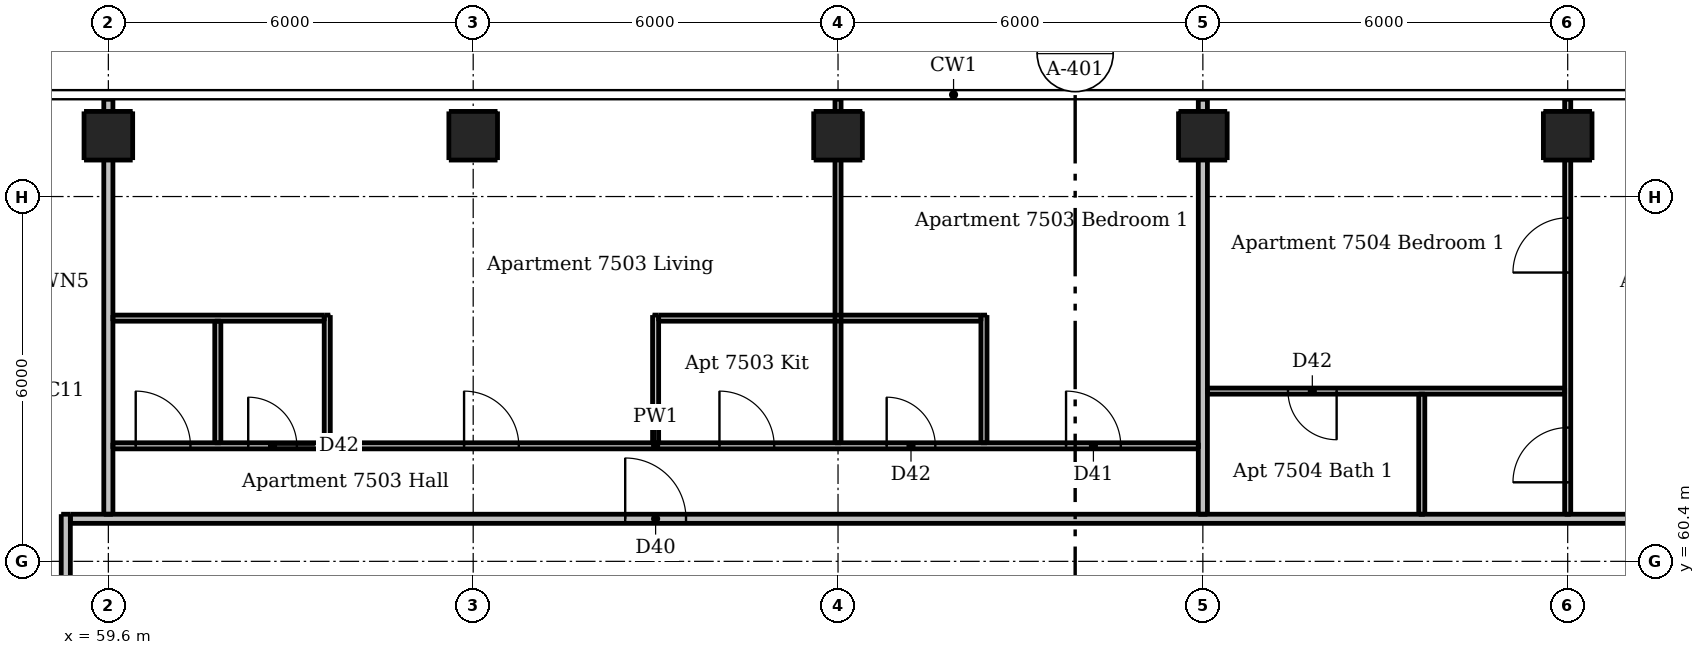
"""IFC4 building model, lengths in metres.
Left out: names, types, materials, properties, quantities, classifications, styles, units other than length and angle.
Written with IfcOpenShell. Run it as: python <this file> out.ifc"""

import sys

from ifc_helpers import new_model, si_unit, direction, frame, frame_2d, origin, origin_2d, place, context, subcontext, project, spatial, rectangle, extrude, element, fill, save


model = new_model("IFC4")
c1 = context("Model", 3, precision=1e-05, world=origin(), true_north=direction((0.0, 1.0)))
c2 = subcontext(c1, "Body", "Model", "MODEL_VIEW")
j1 = project(units=[si_unit("LENGTHUNIT", "METRE"), si_unit("PLANEANGLEUNIT", "RADIAN")], contexts=[c1])
p1 = place(None, origin())
s1 = spatial("IfcSite", under=j1, at=p1, CompositionType="ELEMENT")
p2 = place(p1, origin())
s2 = spatial("IfcBuilding", under=s1, at=p2, CompositionType="ELEMENT")
p3 = place(p2, frame((0.0, 0.0, 278.5)))
s3 = spatial("IfcBuildingStorey", under=s2, at=p3, CompositionType="ELEMENT", Elevation=278.5)
for number, where, z_axis, x_axis in (
    (1, (59.6, 67.4, 0.0), (0.0, 0.0, 1.0), (1.0, 0.0, 0.0)),
    (2, (65.6, 67.4, 0.0), (0.0, 0.0, 1.0), (1.0, 0.0, 0.0)),
    (3, (71.6, 67.4, 0.0), (0.0, 0.0, 1.0), (1.0, 0.0, 0.0)),
    (4, (77.6, 67.4, 0.0), (0.0, 0.0, 1.0), (1.0, 0.0, 0.0)),
    (5, (83.6, 67.4, 0.0), (0.0, 0.0, 1.0), (1.0, 0.0, 0.0)),
):
    element("IfcColumn", number, at=place(p3, frame(where, z_axis=z_axis, x_axis=x_axis)), inside=s3, PredefinedType="COLUMN", context=c2, shape_type="SweptSolid", body=[
        extrude(rectangle(XDim=0.8, YDim=0.8, at=origin_2d()), origin(), (0.0, 0.0, 1.0), 3.0),
    ])
p4 = place(p3, frame((61.4, 62.35, 0.0), z_axis=(0.0, 0.0, 1.0), x_axis=(0.0, 1.0, 0.0)))
e6 = element("IfcWall", 6, at=p4, inside=s3, PredefinedType="PARTITIONING", context=c2, shape_type="SweptSolid", body=[
    extrude(rectangle(XDim=2.0, YDim=0.1, at=frame_2d((1.0, 0.0))), origin(), (0.0, 0.0, 1.0), 3.0),
])
for number, where, z_axis, x_axis in (
    (7, (63.2, 62.35, 0.0), (0.0, 0.0, 1.0), (0.0, 1.0, 0.0)),
    (8, (68.6, 62.35, 0.0), (0.0, 0.0, 1.0), (0.0, 1.0, 0.0)),
):
    element("IfcWall", number, at=place(p3, frame(where, z_axis=z_axis, x_axis=x_axis)), inside=s3, PredefinedType="PARTITIONING", context=c2, shape_type="SweptSolid", body=[
        extrude(rectangle(XDim=2.1, YDim=0.1, at=frame_2d((1.05, 0.0))), origin(), (0.0, 0.0, 1.0), 3.0),
    ])
p5 = place(p3, frame((71.6, 62.35, 0.0), z_axis=(0.0, 0.0, 1.0), x_axis=(0.0, 1.0, 0.0)))
e9 = element("IfcWall", 9, at=p5, inside=s3, PredefinedType="PARTITIONING", context=c2, shape_type="SweptSolid", body=[
    extrude(rectangle(XDim=5.65, YDim=0.1, at=frame_2d((2.825, 0.0))), origin(), (0.0, 0.0, 1.0), 2.466),
])
p6 = place(p3, frame((74.0, 62.35, 0.0), z_axis=(0.0, 0.0, 1.0), x_axis=(0.0, 1.0, 0.0)))
e10 = element("IfcWall", 10, at=p6, inside=s3, PredefinedType="PARTITIONING", context=c2, shape_type="SweptSolid", body=[
    extrude(rectangle(XDim=2.1, YDim=0.1, at=frame_2d((1.05, 0.0))), origin(), (0.0, 0.0, 1.0), 3.0),
])
p7 = place(p3, frame((81.2, 61.175, 0.0), z_axis=(0.0, 0.0, 1.0), x_axis=(0.0, 1.0, 0.0)))
e11 = element("IfcWall", 11, at=p7, inside=s3, PredefinedType="PARTITIONING", context=c2, shape_type="SweptSolid", body=[
    extrude(rectangle(XDim=1.975, YDim=0.1, at=frame_2d((0.987, 0.0))), origin(), (0.0, 0.0, 1.0), 3.0),
])
p8 = place(p3, frame((83.6, 61.175, 0.0), z_axis=(0.0, 0.0, 1.0), x_axis=(0.0, 1.0, 0.0)))
e12 = element("IfcWall", 12, at=p8, inside=s3, PredefinedType="PARTITIONING", context=c2, shape_type="SweptSolid", body=[
    extrude(rectangle(XDim=6.825, YDim=0.1, at=frame_2d((3.413, 0.0))), origin(), (0.0, 0.0, 1.0), 2.466),
])
p9 = place(p8, frame((0.525, 0.0, 0.0)))
e13 = element("IfcOpeningElement", 13, at=p9, cuts=e12, PredefinedType="OPENING", context=c2, shape_type="SweptSolid", body=[
    extrude(rectangle(XDim=0.9, YDim=2.1, at=frame_2d((0.45, 1.05))), frame((0.0, 0.06, 0.0), z_axis=(0.0, -1.0, 0.0), x_axis=(1.0, 0.0, 0.0)), (0.0, 0.0, 1.0), 0.12),
])
p10 = place(p8, frame((3.975, 0.0, 0.0)))
e14 = element("IfcOpeningElement", 14, at=p10, cuts=e12, PredefinedType="OPENING", context=c2, shape_type="SweptSolid", body=[
    extrude(rectangle(XDim=0.9, YDim=2.1, at=frame_2d((0.45, 1.05))), frame((0.0, 0.06, 0.0), z_axis=(0.0, -1.0, 0.0), x_axis=(1.0, 0.0, 0.0)), (0.0, 0.0, 1.0), 0.12),
])
p11 = place(p3, frame((59.675, 64.4, 0.0), z_axis=(0.0, 0.0, 1.0), x_axis=(1.0, 0.0, 0.0)))
e15 = element("IfcWall", 15, at=p11, inside=s3, PredefinedType="PARTITIONING", context=c2, shape_type="SweptSolid", body=[
    extrude(rectangle(XDim=3.475, YDim=0.1, at=frame_2d((1.737, 0.0))), origin(), (0.0, 0.0, 1.0), 3.0),
])
p12 = place(p3, frame((68.65, 64.4, 0.0), z_axis=(0.0, 0.0, 1.0), x_axis=(1.0, 0.0, 0.0)))
e16 = element("IfcWall", 16, at=p12, inside=s3, PredefinedType="PARTITIONING", context=c2, shape_type="SweptSolid", body=[
    extrude(rectangle(XDim=5.3, YDim=0.1, at=frame_2d((2.65, 0.0))), origin(), (0.0, 0.0, 1.0), 3.0),
])
p13 = place(p3, frame((83.55, 63.2, 0.0), z_axis=(0.0, 0.0, 1.0), x_axis=(-1.0, 0.0, 0.0)))
e17 = element("IfcWall", 17, at=p13, inside=s3, PredefinedType="PARTITIONING", context=c2, shape_type="SweptSolid", body=[
    extrude(rectangle(XDim=5.875, YDim=0.1, at=frame_2d((2.938, 0.0))), origin(), (0.0, 0.0, 1.0), 3.0),
])
p14 = place(p13, frame((3.75, 0.0, 0.0)))
e18 = element("IfcOpeningElement", 18, at=p14, cuts=e17, PredefinedType="OPENING", context=c2, shape_type="SweptSolid", body=[
    extrude(rectangle(XDim=0.8, YDim=2.1, at=frame_2d((0.4, 1.05))), frame((0.0, 0.06, 0.0), z_axis=(0.0, -1.0, 0.0), x_axis=(1.0, 0.0, 0.0)), (0.0, 0.0, 1.0), 0.12),
])
p15 = place(p3, frame((59.675, 62.3, 0.0), z_axis=(0.0, 0.0, 1.0), x_axis=(1.0, 0.0, 0.0)))
e19 = element("IfcWall", 19, at=p15, inside=s3, PredefinedType="PARTITIONING", context=c2, shape_type="SweptSolid", body=[
    extrude(rectangle(XDim=17.85, YDim=0.1, at=frame_2d((8.925, 0.0))), origin(), (0.0, 0.0, 1.0), 3.0),
])
p16 = place(p15, frame((5.775, 0.0, 0.0)))
e20 = element("IfcOpeningElement", 20, at=p16, cuts=e19, PredefinedType="OPENING", context=c2, shape_type="SweptSolid", body=[
    extrude(rectangle(XDim=0.9, YDim=2.1, at=frame_2d((0.45, 1.05))), frame((0.0, 0.06, 0.0), z_axis=(0.0, -1.0, 0.0), x_axis=(1.0, 0.0, 0.0)), (0.0, 0.0, 1.0), 0.12),
])
p17 = place(p15, frame((9.975, 0.0, 0.0)))
e21 = element("IfcOpeningElement", 21, at=p17, cuts=e19, PredefinedType="OPENING", context=c2, shape_type="SweptSolid", body=[
    extrude(rectangle(XDim=0.9, YDim=2.1, at=frame_2d((0.45, 1.05))), frame((0.0, 0.06, 0.0), z_axis=(0.0, -1.0, 0.0), x_axis=(1.0, 0.0, 0.0)), (0.0, 0.0, 1.0), 0.12),
])
p18 = place(p15, frame((0.375, 0.0, 0.0)))
e22 = element("IfcOpeningElement", 22, at=p18, cuts=e19, PredefinedType="OPENING", context=c2, shape_type="SweptSolid", body=[
    extrude(rectangle(XDim=0.9, YDim=2.1, at=frame_2d((0.45, 1.05))), frame((0.0, 0.06, 0.0), z_axis=(0.0, -1.0, 0.0), x_axis=(1.0, 0.0, 0.0)), (0.0, 0.0, 1.0), 0.12),
])
p19 = place(p15, frame((2.225, 0.0, 0.0)))
e23 = element("IfcOpeningElement", 23, at=p19, cuts=e19, PredefinedType="OPENING", context=c2, shape_type="SweptSolid", body=[
    extrude(rectangle(XDim=0.8, YDim=2.1, at=frame_2d((0.4, 1.05))), frame((0.0, 0.06, 0.0), z_axis=(0.0, -1.0, 0.0), x_axis=(1.0, 0.0, 0.0)), (0.0, 0.0, 1.0), 0.12),
])
p20 = place(p15, frame((15.675, 0.0, 0.0)))
e24 = element("IfcOpeningElement", 24, at=p20, cuts=e19, PredefinedType="OPENING", context=c2, shape_type="SweptSolid", body=[
    extrude(rectangle(XDim=0.9, YDim=2.1, at=frame_2d((0.45, 1.05))), frame((0.0, 0.06, 0.0), z_axis=(0.0, -1.0, 0.0), x_axis=(1.0, 0.0, 0.0)), (0.0, 0.0, 1.0), 0.12),
])
p21 = place(p15, frame((12.725, 0.0, 0.0)))
e25 = element("IfcOpeningElement", 25, at=p21, cuts=e19, PredefinedType="OPENING", context=c2, shape_type="SweptSolid", body=[
    extrude(rectangle(XDim=0.8, YDim=2.1, at=frame_2d((0.4, 1.05))), frame((0.0, 0.06, 0.0), z_axis=(0.0, -1.0, 0.0), x_axis=(1.0, 0.0, 0.0)), (0.0, 0.0, 1.0), 0.12),
])
p22 = place(p3, frame((58.9, 30.325, 0.0), z_axis=(0.0, 0.0, 1.0), x_axis=(0.0, 1.0, 0.0)))
e26 = element("IfcWall", 26, at=p22, inside=s3, PredefinedType="PARTITIONING", context=c2, shape_type="SweptSolid", body=[
    extrude(rectangle(XDim=30.85, YDim=0.15, at=frame_2d((15.425, 0.0))), origin(), (0.0, 0.0, 1.0), 3.0),
])
p23 = place(p22, frame((9.225, 0.0, 0.0)))
e27 = element("IfcOpeningElement", 27, at=p23, cuts=e26, PredefinedType="OPENING", context=c2, shape_type="SweptSolid", body=[
    extrude(rectangle(XDim=1.0, YDim=2.1, at=frame_2d((0.5, 1.05))), frame((0.0, 0.085, 0.0), z_axis=(0.0, -1.0, 0.0), x_axis=(1.0, 0.0, 0.0)), (0.0, 0.0, 1.0), 0.17),
])
p24 = place(p22, frame((26.925, 0.0, 0.0)))
e28 = element("IfcOpeningElement", 28, at=p24, cuts=e26, PredefinedType="OPENING", context=c2, shape_type="SweptSolid", body=[
    extrude(rectangle(XDim=1.0, YDim=2.1, at=frame_2d((0.5, 1.05))), frame((0.0, 0.085, 0.0), z_axis=(0.0, -1.0, 0.0), x_axis=(1.0, 0.0, 0.0)), (0.0, 0.0, 1.0), 0.17),
])
p25 = place(p3, frame((59.6, 61.175, 0.0), z_axis=(0.0, 0.0, 1.0), x_axis=(0.0, 1.0, 0.0)))
e29 = element("IfcWall", 29, at=p25, inside=s3, PredefinedType="PARTITIONING", context=c2, shape_type="SweptSolid", body=[
    extrude(rectangle(XDim=6.825, YDim=0.15, at=frame_2d((3.413, 0.0))), origin(), (0.0, 0.0, 1.0), 2.46),
])
p26 = place(p3, frame((77.6, 61.175, 0.0), z_axis=(0.0, 0.0, 1.0), x_axis=(0.0, 1.0, 0.0)))
e30 = element("IfcWall", 30, at=p26, inside=s3, PredefinedType="PARTITIONING", context=c2, shape_type="SweptSolid", body=[
    extrude(rectangle(XDim=6.825, YDim=0.15, at=frame_2d((3.413, 0.0))), origin(), (0.0, 0.0, 1.0), 2.466),
])
p27 = place(p3, frame((58.975, 61.1, 0.0), z_axis=(0.0, 0.0, 1.0), x_axis=(1.0, 0.0, 0.0)))
e31 = element("IfcWall", 31, at=p27, inside=s3, PredefinedType="PARTITIONING", context=c2, shape_type="SweptSolid", body=[
    extrude(rectangle(XDim=29.25, YDim=0.15, at=frame_2d((14.625, 0.0))), origin(), (0.0, 0.0, 1.0), 3.0),
])
p28 = place(p27, frame((9.125, 0.0, 0.0)))
e32 = element("IfcOpeningElement", 32, at=p28, cuts=e31, PredefinedType="OPENING", context=c2, shape_type="SweptSolid", body=[
    extrude(rectangle(XDim=1.0, YDim=2.1, at=frame_2d((0.5, 1.05))), frame((0.0, 0.085, 0.0), z_axis=(0.0, -1.0, 0.0), x_axis=(1.0, 0.0, 0.0)), (0.0, 0.0, 1.0), 0.17),
])
p29 = place(p27, frame((26.475, 0.0, 0.0)))
e33 = element("IfcOpeningElement", 33, at=p29, cuts=e31, PredefinedType="OPENING", context=c2, shape_type="SweptSolid", body=[
    extrude(rectangle(XDim=1.0, YDim=2.1, at=frame_2d((0.5, 1.05))), frame((0.0, 0.085, 0.0), z_axis=(0.0, -1.0, 0.0), x_axis=(1.0, 0.0, 0.0)), (0.0, 0.0, 1.0), 0.17),
])
p30 = place(p28, origin())
e34 = element("IfcDoor", 34, at=p30, inside=s3, OperationType="SINGLE_SWING_LEFT", PredefinedType="DOOR", context=c2, shape_type="SweptSolid", body=[
    extrude(rectangle(XDim=1.0, YDim=2.1, at=frame_2d((0.5, 1.05))), frame((0.0, 0.025, 0.0), z_axis=(0.0, -1.0, 0.0), x_axis=(1.0, 0.0, 0.0)), (0.0, 0.0, 1.0), 0.05),
])
fill(e32, e34)
p31 = place(p16, origin())
e35 = element("IfcDoor", 35, at=p31, inside=s3, OperationType="SINGLE_SWING_LEFT", PredefinedType="DOOR", context=c2, shape_type="SweptSolid", body=[
    extrude(rectangle(XDim=0.9, YDim=2.1, at=frame_2d((0.45, 1.05))), frame((0.0, 0.025, 0.0), z_axis=(0.0, -1.0, 0.0), x_axis=(1.0, 0.0, 0.0)), (0.0, 0.0, 1.0), 0.05),
])
fill(e20, e35)
p32 = place(p17, origin())
e36 = element("IfcDoor", 36, at=p32, inside=s3, OperationType="SINGLE_SWING_LEFT", PredefinedType="DOOR", context=c2, shape_type="SweptSolid", body=[
    extrude(rectangle(XDim=0.9, YDim=2.1, at=frame_2d((0.45, 1.05))), frame((0.0, 0.025, 0.0), z_axis=(0.0, -1.0, 0.0), x_axis=(1.0, 0.0, 0.0)), (0.0, 0.0, 1.0), 0.05),
])
fill(e21, e36)
p33 = place(p18, origin())
e37 = element("IfcDoor", 37, at=p33, inside=s3, OperationType="SINGLE_SWING_LEFT", PredefinedType="DOOR", context=c2, shape_type="SweptSolid", body=[
    extrude(rectangle(XDim=0.9, YDim=2.1, at=frame_2d((0.45, 1.05))), frame((0.0, 0.025, 0.0), z_axis=(0.0, -1.0, 0.0), x_axis=(1.0, 0.0, 0.0)), (0.0, 0.0, 1.0), 0.05),
])
fill(e22, e37)
p34 = place(p19, origin())
e38 = element("IfcDoor", 38, at=p34, inside=s3, OperationType="SINGLE_SWING_LEFT", PredefinedType="DOOR", context=c2, shape_type="SweptSolid", body=[
    extrude(rectangle(XDim=0.8, YDim=2.1, at=frame_2d((0.4, 1.05))), frame((0.0, 0.025, 0.0), z_axis=(0.0, -1.0, 0.0), x_axis=(1.0, 0.0, 0.0)), (0.0, 0.0, 1.0), 0.05),
])
fill(e23, e38)
p35 = place(p20, origin())
e39 = element("IfcDoor", 39, at=p35, inside=s3, OperationType="SINGLE_SWING_LEFT", PredefinedType="DOOR", context=c2, shape_type="SweptSolid", body=[
    extrude(rectangle(XDim=0.9, YDim=2.1, at=frame_2d((0.45, 1.05))), frame((0.0, 0.025, 0.0), z_axis=(0.0, -1.0, 0.0), x_axis=(1.0, 0.0, 0.0)), (0.0, 0.0, 1.0), 0.05),
])
fill(e24, e39)
p36 = place(p21, origin())
e40 = element("IfcDoor", 40, at=p36, inside=s3, OperationType="SINGLE_SWING_LEFT", PredefinedType="DOOR", context=c2, shape_type="SweptSolid", body=[
    extrude(rectangle(XDim=0.8, YDim=2.1, at=frame_2d((0.4, 1.05))), frame((0.0, 0.025, 0.0), z_axis=(0.0, -1.0, 0.0), x_axis=(1.0, 0.0, 0.0)), (0.0, 0.0, 1.0), 0.05),
])
fill(e25, e40)
p37 = place(p9, origin())
e41 = element("IfcDoor", 41, at=p37, inside=s3, OperationType="SINGLE_SWING_LEFT", PredefinedType="DOOR", context=c2, shape_type="SweptSolid", body=[
    extrude(rectangle(XDim=0.9, YDim=2.1, at=frame_2d((0.45, 1.05))), frame((0.0, 0.025, 0.0), z_axis=(0.0, -1.0, 0.0), x_axis=(1.0, 0.0, 0.0)), (0.0, 0.0, 1.0), 0.05),
])
fill(e13, e41)
p38 = place(p10, origin())
e42 = element("IfcDoor", 42, at=p38, inside=s3, OperationType="SINGLE_SWING_LEFT", PredefinedType="DOOR", context=c2, shape_type="SweptSolid", body=[
    extrude(rectangle(XDim=0.9, YDim=2.1, at=frame_2d((0.45, 1.05))), frame((0.0, 0.025, 0.0), z_axis=(0.0, -1.0, 0.0), x_axis=(1.0, 0.0, 0.0)), (0.0, 0.0, 1.0), 0.05),
])
fill(e14, e42)
p39 = place(p14, origin())
e43 = element("IfcDoor", 43, at=p39, inside=s3, OperationType="SINGLE_SWING_LEFT", PredefinedType="DOOR", context=c2, shape_type="SweptSolid", body=[
    extrude(rectangle(XDim=0.8, YDim=2.1, at=frame_2d((0.4, 1.05))), frame((0.0, 0.025, 0.0), z_axis=(0.0, -1.0, 0.0), x_axis=(1.0, 0.0, 0.0)), (0.0, 0.0, 1.0), 0.05),
])
fill(e18, e43)
save(model, sys.argv[1])
